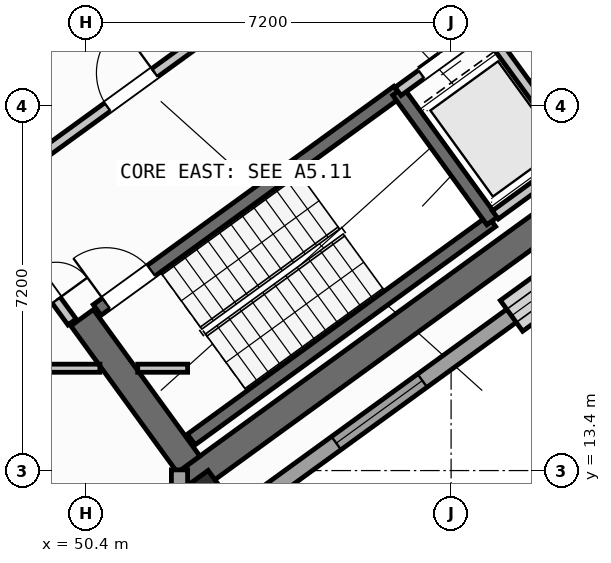
"""IFC4 building model, lengths in metres.
Left out: names, types, materials, properties, quantities, classifications, styles, units other than length and angle.
Written with IfcOpenShell. Run it as: python <this file> out.ifc"""

import sys

from ifc_helpers import new_model, si_unit, direction, frame, frame_2d, origin, origin_2d, place, context, subcontext, project, spatial, rectangle, hollow_rectangle, extrude, source, transform, mapped, element, fill, save


model = new_model("IFC4")
c1 = context("Model", 3, precision=1e-05, world=origin(), true_north=direction((0.0, 1.0)))
c2 = subcontext(c1, "Body", "Model", "MODEL_VIEW")
j1 = project(units=[si_unit("LENGTHUNIT", "METRE"), si_unit("PLANEANGLEUNIT", "RADIAN")], contexts=[c1])
p1 = place(None, origin())
s1 = spatial("IfcSite", under=j1, at=p1, CompositionType="ELEMENT")
p2 = place(p1, origin())
s2 = spatial("IfcBuilding", under=s1, at=p2, CompositionType="ELEMENT")
p3 = place(p2, frame((0.0, 0.0, 123.3)))
s3 = spatial("IfcBuildingStorey", under=s2, at=p3, CompositionType="ELEMENT", Elevation=123.3)
p4 = place(p3, frame((52.359, 13.14, 0.0), z_axis=(0.0, 0.0, 1.0), x_axis=(0.809014896919, 0.587788139183, 0.0)))
e1 = element("IfcWall", 1, at=p4, inside=s3, PredefinedType="SHEAR", context=c2, shape_type="SweptSolid", body=[
    extrude(rectangle(XDim=12.34, YDim=0.55, at=frame_2d((6.17, 0.0))), origin(), (0.0, 0.0, 1.0), 4.22),
])
p5 = place(p3, frame((52.42, 13.524, 0.0), z_axis=(0.0, 0.0, 1.0), x_axis=(-0.587802113096, 0.809004744015, 0.0)))
e2 = element("IfcWall", 2, at=p5, inside=s3, PredefinedType="SHEAR", context=c2, shape_type="SweptSolid", body=[
    extrude(rectangle(XDim=3.575, YDim=0.55, at=frame_2d((1.788, 0.0))), origin(), (0.0, 0.0, 1.0), 4.22),
])
m1 = source(origin(), c2, "Body", "SweptSolid", [
    extrude(hollow_rectangle(XDim=0.9, YDim=0.9, WallThickness=0.036, at=origin_2d()), origin(), (0.0, 0.0, 1.0), 4.5),
])
p6 = place(p3, frame((52.705, 12.773, 0.0), z_axis=(0.0, 0.0, 1.0), x_axis=(0.809016994375, 0.587785252292, 0.0)))
e3 = element("IfcColumn", 3, at=p6, inside=s3, PredefinedType="COLUMN", context=c2, shape_type="MappedRepresentation", body=[
    mapped(m1, transform((0.0, 0.0, 0.0), scale=1.0)),
])
p7 = place(p3, frame((67.454, 22.747, 0.0), z_axis=(0.0, 0.0, 1.0), x_axis=(-0.809021120468, -0.587779573171, 0.0)))
e4 = element("IfcWall", 4, at=p7, inside=s3, PredefinedType="STANDARD", context=c2, shape_type="SweptSolid", body=[
    extrude(rectangle(XDim=17.588, YDim=0.32, at=frame_2d((8.794, 0.0))), origin(), (0.0, 0.0, 1.0), 4.22),
])
p8 = place(p7, frame((1.611, 0.0, 0.0)))
e5 = element("IfcOpeningElement", 5, at=p8, cuts=e4, PredefinedType="OPENING", context=c2, shape_type="SweptSolid", body=[
    extrude(rectangle(XDim=1.05, YDim=2.15, at=frame_2d((0.525, 1.075))), frame((0.0, 0.17, 0.0), z_axis=(0.0, -1.0, 0.0), x_axis=(1.0, 0.0, 0.0)), (0.0, 0.0, 1.0), 0.34),
])
p9 = place(p7, frame((8.606, 0.0, 0.8)))
e6 = element("IfcOpeningElement", 6, at=p9, cuts=e4, PredefinedType="OPENING", context=c2, shape_type="SweptSolid", body=[
    extrude(rectangle(XDim=2.1, YDim=1.55, at=frame_2d((1.05, 0.775))), frame((0.0, 0.17, 0.0), z_axis=(0.0, -1.0, 0.0), x_axis=(1.0, 0.0, 0.0)), (0.0, 0.0, 1.0), 0.34),
])
p10 = place(p7, frame((12.881, 0.0, 0.8)))
e7 = element("IfcOpeningElement", 7, at=p10, cuts=e4, PredefinedType="OPENING", context=c2, shape_type="SweptSolid", body=[
    extrude(rectangle(XDim=2.1, YDim=1.55, at=frame_2d((1.05, 0.775))), frame((0.0, 0.17, 0.0), z_axis=(0.0, -1.0, 0.0), x_axis=(1.0, 0.0, 0.0)), (0.0, 0.0, 1.0), 0.34),
])
p11 = place(p3, frame((52.24, 13.414, 0.0), z_axis=(0.0, 0.0, 1.0), x_axis=(0.0, -1.0, 0.0)))
e8 = element("IfcWall", 8, at=p11, inside=s3, PredefinedType="STANDARD", context=c2, shape_type="SweptSolid", body=[
    extrude(rectangle(XDim=9.948, YDim=0.32, at=frame_2d((4.974, 0.0))), origin(), (0.0, 0.0, 1.0), 4.22),
])
p12 = place(p11, frame((3.247, 0.0, 0.8)))
e9 = element("IfcOpeningElement", 9, at=p12, cuts=e8, PredefinedType="OPENING", context=c2, shape_type="SweptSolid", body=[
    extrude(rectangle(XDim=2.1, YDim=1.55, at=frame_2d((1.05, 0.775))), frame((0.0, 0.17, 0.0), z_axis=(0.0, -1.0, 0.0), x_axis=(1.0, 0.0, 0.0)), (0.0, 0.0, 1.0), 0.34),
])
p13 = place(p11, frame((7.183, 0.0, 0.85)))
e10 = element("IfcOpeningElement", 10, at=p13, cuts=e8, PredefinedType="OPENING", context=c2, shape_type="SweptSolid", body=[
    extrude(rectangle(XDim=1.8, YDim=1.5, at=frame_2d((0.9, 0.75))), frame((0.0, 0.17, 0.0), z_axis=(0.0, -1.0, 0.0), x_axis=(1.0, 0.0, 0.0)), (0.0, 0.0, 1.0), 0.34),
])
p14 = place(p3, frame((52.472, 14.013, 0.0), z_axis=(0.0, 0.0, 1.0), x_axis=(0.809028366311, 0.587769599847, 0.0)))
e11 = element("IfcWall", 11, at=p14, inside=s3, PredefinedType="SHEAR", context=c2, shape_type="SweptSolid", body=[
    extrude(rectangle(XDim=7.33, YDim=0.26, at=frame_2d((3.665, 0.0))), origin(), (0.0, 0.0, 1.0), 4.22),
])
p15 = place(p3, frame((50.615, 16.57, 0.0), z_axis=(0.0, 0.0, 1.0), x_axis=(0.809028366311, 0.587769599847, 0.0)))
e12 = element("IfcWall", 12, at=p15, inside=s3, PredefinedType="SHEAR", context=c2, shape_type="SweptSolid", body=[
    extrude(rectangle(XDim=7.33, YDim=0.26, at=frame_2d((3.665, 0.0))), origin(), (0.0, 0.0, 1.0), 4.22),
])
p16 = place(p15, frame((0.22, 0.0, 0.0)))
e13 = element("IfcOpeningElement", 13, at=p16, cuts=e12, PredefinedType="OPENING", context=c2, shape_type="SweptSolid", body=[
    extrude(rectangle(XDim=1.1, YDim=2.1, at=frame_2d((0.55, 1.05))), frame((0.0, 0.14, 0.0), z_axis=(0.0, -1.0, 0.0), x_axis=(1.0, 0.0, 0.0)), (0.0, 0.0, 1.0), 0.28),
])
p17 = place(p3, frame((58.41, 18.327, 0.0), z_axis=(0.0, 0.0, 1.0), x_axis=(-0.58776738483, 0.809029975545, 0.0)))
e14 = element("IfcWall", 14, at=p17, inside=s3, PredefinedType="SHEAR", context=c2, shape_type="SweptSolid", body=[
    extrude(rectangle(XDim=3.16, YDim=0.26, at=frame_2d((1.58, 0.0))), origin(), (0.0, 0.0, 1.0), 4.22),
])
p18 = place(p3, frame((47.065, 21.407, 0.0), z_axis=(0.0, 0.0, 1.0), x_axis=(0.809032984992, 0.587763242466, 0.0)))
e15 = element("IfcWall", 15, at=p18, inside=s3, PredefinedType="STANDARD", context=c2, shape_type="SweptSolid", body=[
    extrude(rectangle(XDim=3.448, YDim=0.2, at=frame_2d((1.724, 0.0))), origin(), (0.0, 0.0, 1.0), 4.21),
])
p19 = place(p18, frame((0.458, 0.0, 0.0)))
e16 = element("IfcOpeningElement", 16, at=p19, cuts=e15, PredefinedType="OPENING", context=c2, shape_type="SweptSolid", body=[
    extrude(rectangle(XDim=1.3, YDim=2.2, at=frame_2d((0.65, 1.1))), frame((0.0, 0.11, 0.0), z_axis=(0.0, -1.0, 0.0), x_axis=(1.0, 0.0, 0.0)), (0.0, 0.0, 1.0), 0.22),
])
p20 = place(p3, frame((48.758, 19.077, 0.0), z_axis=(0.0, 0.0, 1.0), x_axis=(0.809005065155, 0.587801671104, 0.0)))
e17 = element("IfcWall", 17, at=p20, inside=s3, PredefinedType="STANDARD", context=c2, shape_type="SweptSolid", body=[
    extrude(rectangle(XDim=5.768, YDim=0.2, at=frame_2d((2.884, 0.0))), origin(), (0.0, 0.0, 1.0), 4.21),
])
p21 = place(p20, frame((2.548, 0.0, 0.0)))
e18 = element("IfcOpeningElement", 18, at=p21, cuts=e17, PredefinedType="OPENING", context=c2, shape_type="SweptSolid", body=[
    extrude(rectangle(XDim=1.15, YDim=2.1, at=frame_2d((0.575, 1.05))), frame((0.0, 0.11, 0.0), z_axis=(0.0, -1.0, 0.0), x_axis=(1.0, 0.0, 0.0)), (0.0, 0.0, 1.0), 0.22),
])
p22 = place(p3, frame((56.553, 20.884, 0.0), z_axis=(0.0, 0.0, 1.0), x_axis=(0.809023564264, 0.58777620951, 0.0)))
e19 = element("IfcWall", 19, at=p22, inside=s3, PredefinedType="STANDARD", context=c2, shape_type="SweptSolid", body=[
    extrude(rectangle(XDim=3.818, YDim=0.2, at=frame_2d((1.909, 0.0))), origin(), (0.0, 0.0, 1.0), 4.21),
])
p23 = place(p22, frame((0.57, 0.0, 0.0)))
e20 = element("IfcOpeningElement", 20, at=p23, cuts=e19, PredefinedType="OPENING", context=c2, shape_type="SweptSolid", body=[
    extrude(rectangle(XDim=1.1, YDim=2.15, at=frame_2d((0.55, 1.075))), frame((0.0, 0.11, 0.0), z_axis=(0.0, -1.0, 0.0), x_axis=(1.0, 0.0, 0.0)), (0.0, 0.0, 1.0), 0.22),
])
p24 = place(p22, frame((2.65, 0.0, 0.0)))
e21 = element("IfcOpeningElement", 21, at=p24, cuts=e19, PredefinedType="OPENING", context=c2, shape_type="SweptSolid", body=[
    extrude(rectangle(XDim=0.86, YDim=2.05, at=frame_2d((0.43, 1.025))), frame((0.0, 0.11, 0.0), z_axis=(0.0, -1.0, 0.0), x_axis=(1.0, 0.0, 0.0)), (0.0, 0.0, 1.0), 0.22),
])
p25 = place(p3, frame((60.067, 19.655, 0.0), z_axis=(0.0, 0.0, 1.0), x_axis=(-0.587800520745, 0.809005900975, 0.0)))
e22 = element("IfcWall", 22, at=p25, inside=s3, PredefinedType="STANDARD", context=c2, shape_type="SweptSolid", body=[
    extrude(rectangle(XDim=2.66, YDim=0.2, at=frame_2d((1.33, 0.0))), origin(), (0.0, 0.0, 1.0), 4.21),
])
p26 = place(p3, frame((58.472, 18.447, 0.0), z_axis=(0.0, 0.0, 1.0), x_axis=(0.809018631237, 0.587782999339, 0.0)))
e23 = element("IfcWall", 23, at=p26, inside=s3, PredefinedType="STANDARD", context=c2, shape_type="SweptSolid", body=[
    extrude(rectangle(XDim=3.698, YDim=0.2, at=frame_2d((1.849, 0.0))), origin(), (0.0, 0.0, 1.0), 4.21),
])
p27 = place(p3, frame((35.237, 15.42, 0.0), z_axis=(0.0, 0.0, 1.0), x_axis=(1.0, 0.0, 0.0)))
e24 = element("IfcWall", 24, at=p27, inside=s3, PredefinedType="PARTITIONING", context=c2, shape_type="SweptSolid", body=[
    extrude(rectangle(XDim=15.432, YDim=0.16, at=frame_2d((7.716, 0.0))), origin(), (0.0, 0.0, 1.0), 4.21),
])
p28 = place(p27, frame((0.674, 0.0, 0.0)))
e25 = element("IfcOpeningElement", 25, at=p28, cuts=e24, PredefinedType="OPENING", context=c2, shape_type="SweptSolid", body=[
    extrude(rectangle(XDim=1.0, YDim=2.1, at=frame_2d((0.5, 1.05))), frame((0.0, 0.09, 0.0), z_axis=(0.0, -1.0, 0.0), x_axis=(1.0, 0.0, 0.0)), (0.0, 0.0, 1.0), 0.18),
])
p29 = place(p27, frame((9.094, 0.0, 0.0)))
e26 = element("IfcOpeningElement", 26, at=p29, cuts=e24, PredefinedType="OPENING", context=c2, shape_type="SweptSolid", body=[
    extrude(rectangle(XDim=1.0, YDim=2.1, at=frame_2d((0.5, 1.05))), frame((0.0, 0.09, 0.0), z_axis=(0.0, -1.0, 0.0), x_axis=(1.0, 0.0, 0.0)), (0.0, 0.0, 1.0), 0.18),
])
p30 = place(p3, frame((51.416, 15.42, 0.0), z_axis=(0.0, 0.0, 1.0), x_axis=(1.0, 0.0, 0.0)))
e27 = element("IfcWall", 27, at=p30, inside=s3, PredefinedType="PARTITIONING", context=c2, shape_type="SweptSolid", body=[
    extrude(rectangle(XDim=0.984, YDim=0.16, at=frame_2d((0.492, 0.0))), origin(), (0.0, 0.0, 1.0), 4.21),
])
p31 = place(p3, frame((50.119, 16.333, 0.0), z_axis=(0.0, 0.0, 1.0), x_axis=(-0.587749856981, 0.809042709391, 0.0)))
e28 = element("IfcWall", 28, at=p31, inside=s3, PredefinedType="STANDARD", context=c2, shape_type="SweptSolid", body=[
    extrude(rectangle(XDim=2.96, YDim=0.2, at=frame_2d((1.48, 0.0))), origin(), (0.0, 0.0, 1.0), 2.395),
])
p32 = place(p31, frame((0.53, 0.0, 0.0)))
e29 = element("IfcOpeningElement", 29, at=p32, cuts=e28, PredefinedType="OPENING", context=c2, shape_type="SweptSolid", body=[
    extrude(rectangle(XDim=1.5, YDim=2.15, at=frame_2d((0.75, 1.075))), frame((0.0, 0.11, 0.0), z_axis=(0.0, -1.0, 0.0), x_axis=(1.0, 0.0, 0.0)), (0.0, 0.0, 1.0), 0.22),
])
m2 = source(origin(), c2, "Body", "SweptSolid", [
    extrude(rectangle(XDim=2.1, YDim=1.55, at=frame_2d((1.05, 0.775))), frame((0.0, 0.03, 0.0), z_axis=(0.0, -1.0, 0.0), x_axis=(1.0, 0.0, 0.0)), (0.0, 0.0, 1.0), 0.06),
])
p33 = place(p9, origin())
e30 = element("IfcWindow", 30, at=p33, inside=s3, PartitioningType="SINGLE_PANEL", PredefinedType="WINDOW", context=c2, shape_type="MappedRepresentation", body=[
    mapped(m2, transform((0.0, 0.0, 0.0), scale=1.0)),
])
fill(e6, e30)
p34 = place(p10, origin())
e31 = element("IfcWindow", 31, at=p34, inside=s3, PartitioningType="SINGLE_PANEL", PredefinedType="WINDOW", context=c2, shape_type="MappedRepresentation", body=[
    mapped(m2, transform((0.0, 0.0, 0.0), scale=1.0)),
])
fill(e7, e31)
m3 = source(origin(), c2, "Body", "SweptSolid", [
    extrude(rectangle(XDim=1.1, YDim=2.1, at=frame_2d((0.55, 1.05))), frame((0.0, 0.025, 0.0), z_axis=(0.0, -1.0, 0.0), x_axis=(1.0, 0.0, 0.0)), (0.0, 0.0, 1.0), 0.05),
])
p35 = place(p16, origin())
e32 = element("IfcDoor", 32, at=p35, inside=s3, OperationType="SINGLE_SWING_LEFT", PredefinedType="DOOR", context=c2, shape_type="MappedRepresentation", body=[
    mapped(m3, transform((0.0, 0.0, 0.0), scale=1.0)),
])
fill(e13, e32)
m4 = source(origin(), c2, "Body", "SweptSolid", [
    extrude(rectangle(XDim=1.15, YDim=2.1, at=frame_2d((0.575, 1.05))), frame((0.0, 0.025, 0.0), z_axis=(0.0, -1.0, 0.0), x_axis=(1.0, 0.0, 0.0)), (0.0, 0.0, 1.0), 0.05),
])
p36 = place(p21, origin())
e33 = element("IfcDoor", 33, at=p36, inside=s3, OperationType="SINGLE_SWING_RIGHT", PredefinedType="DOOR", context=c2, shape_type="MappedRepresentation", body=[
    mapped(m4, transform((0.0, 0.0, 0.0), scale=1.0)),
])
fill(e18, e33)
m5 = source(origin(), c2, "Body", "SweptSolid", [
    extrude(rectangle(XDim=1.1, YDim=2.15, at=frame_2d((0.55, 1.075))), frame((0.0, 0.025, 0.0), z_axis=(0.0, -1.0, 0.0), x_axis=(1.0, 0.0, 0.0)), (0.0, 0.0, 1.0), 0.05),
])
p37 = place(p23, origin())
e34 = element("IfcDoor", 34, at=p37, inside=s3, OperationType="DOUBLE_DOOR_SLIDING", PredefinedType="DOOR", context=c2, shape_type="MappedRepresentation", body=[
    mapped(m5, transform((0.0, 0.0, 0.0), scale=1.0)),
])
fill(e20, e34)
m6 = source(origin(), c2, "Body", "SweptSolid", [
    extrude(rectangle(XDim=1.5, YDim=2.15, at=frame_2d((0.75, 1.075))), frame((0.0, 0.025, 0.0), z_axis=(0.0, -1.0, 0.0), x_axis=(1.0, 0.0, 0.0)), (0.0, 0.0, 1.0), 0.05),
])
p38 = place(p32, frame((1.5, 0.0, 0.0), z_axis=(0.0, 0.0, 1.0), x_axis=(-1.0, 0.0, 0.0)))
e35 = element("IfcDoor", 35, at=p38, inside=s3, OperationType="DOUBLE_DOOR_SINGLE_SWING", PredefinedType="DOOR", context=c2, shape_type="MappedRepresentation", body=[
    mapped(m6, transform((0.0, 0.0, 0.0), scale=1.0)),
])
fill(e29, e35)
save(model, sys.argv[1])
